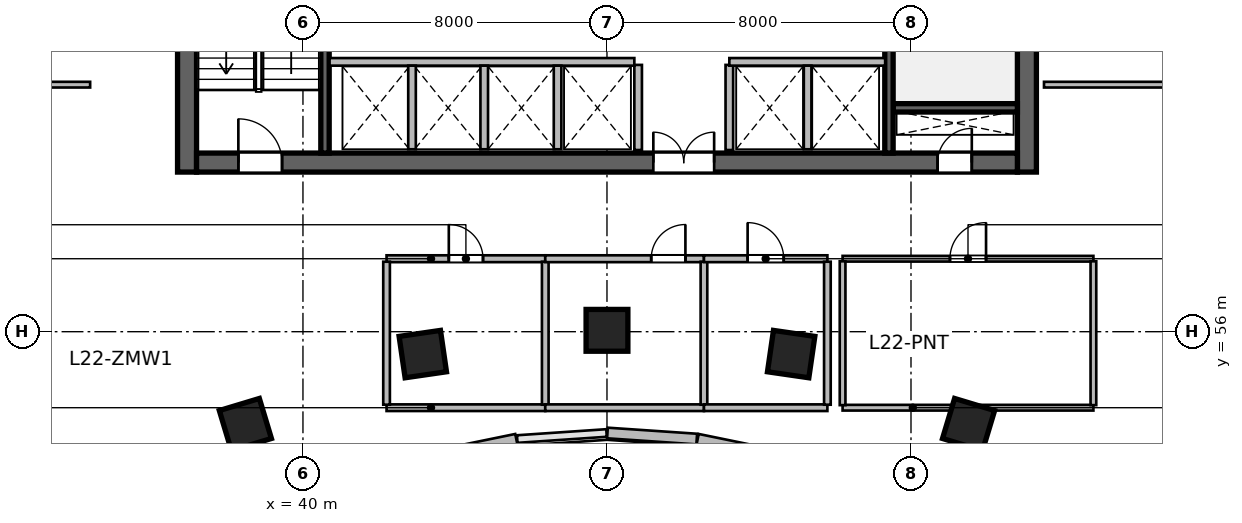
"""IFC4 building model, lengths in metres.
Left out: names, types, materials, properties, quantities, classifications, styles, units other than length and angle.
Written with IfcOpenShell. Run it as: python <this file> out.ifc"""

import sys

from ifc_helpers import new_model, si_unit, direction, frame, frame_2d, origin, origin_2d, place, context, subcontext, project, spatial, rectangle, extrude, source, transform, mapped, element, fill, save


model = new_model("IFC4")
c1 = context("Model", 3, precision=1e-05, world=origin(), true_north=direction((0.0, 1.0)))
c2 = subcontext(c1, "Body", "Model", "MODEL_VIEW")
j1 = project(units=[si_unit("LENGTHUNIT", "METRE"), si_unit("PLANEANGLEUNIT", "RADIAN")], contexts=[c1])
p1 = place(None, origin())
s1 = spatial("IfcSite", under=j1, at=p1, CompositionType="ELEMENT")
p2 = place(p1, origin())
s2 = spatial("IfcBuilding", under=s1, at=p2, CompositionType="ELEMENT")
p3 = place(p2, frame((0.0, 0.0, 96.0)))
s3 = spatial("IfcBuildingStorey", under=s2, at=p3, CompositionType="ELEMENT", Elevation=96.0)
m1 = source(origin(), c2, "Body", "SweptSolid", [
    extrude(rectangle(XDim=12.0, YDim=0.5, at=frame_2d((6.0, 0.0))), origin(), (0.0, 0.0, 1.0), 3.9),
])
for number, where, z_axis, x_axis in (
    (1, (36.95, 60.2, 0.0), (0.0, 0.0, 1.0), (0.0, 1.0, 0.0)),
    (2, (59.05, 60.2, 0.0), (0.0, 0.0, 1.0), (0.0, 1.0, 0.0)),
):
    element("IfcWall", number, at=place(p3, frame(where, z_axis=z_axis, x_axis=x_axis)), inside=s3, PredefinedType="SHEAR", context=c2, shape_type="MappedRepresentation", body=[
        mapped(m1, transform((0.0, 0.0, 0.0), scale=1.0)),
    ])
m2 = source(origin(), c2, "Body", "SweptSolid", [
    extrude(rectangle(XDim=21.6, YDim=0.5, at=frame_2d((10.8, 0.0))), origin(), (0.0, 0.0, 1.0), 3.9),
])
p4 = place(p3, frame((37.2, 60.45, 0.0), z_axis=(0.0, 0.0, 1.0), x_axis=(1.0, 0.0, 0.0)))
e3 = element("IfcWall", 3, at=p4, inside=s3, PredefinedType="SHEAR", context=c2, shape_type="MappedRepresentation", body=[
    mapped(m2, transform((0.0, 0.0, 0.0), scale=1.0)),
])
p5 = place(p4, frame((1.1, 0.0, 0.0)))
e4 = element("IfcOpeningElement", 4, at=p5, cuts=e3, PredefinedType="OPENING", context=c2, shape_type="SweptSolid", body=[
    extrude(rectangle(XDim=1.15, YDim=2.15, at=frame_2d((0.575, 1.075))), frame((0.0, 0.26, 0.0), z_axis=(0.0, -1.0, 0.0), x_axis=(1.0, 0.0, 0.0)), (0.0, 0.0, 1.0), 0.52),
])
p6 = place(p4, frame((19.5, 0.0, 0.0)))
e5 = element("IfcOpeningElement", 5, at=p6, cuts=e3, PredefinedType="OPENING", context=c2, shape_type="SweptSolid", body=[
    extrude(rectangle(XDim=0.9, YDim=2.1, at=frame_2d((0.45, 1.05))), frame((0.0, 0.26, 0.0), z_axis=(0.0, -1.0, 0.0), x_axis=(1.0, 0.0, 0.0)), (0.0, 0.0, 1.0), 0.52),
])
p7 = place(p4, frame((12.02, 0.0, 0.0)))
e6 = element("IfcOpeningElement", 6, at=p7, cuts=e3, PredefinedType="OPENING", context=c2, shape_type="SweptSolid", body=[
    extrude(rectangle(XDim=1.6, YDim=2.15, at=frame_2d((0.8, 1.075))), frame((0.0, 0.26, 0.0), z_axis=(0.0, -1.0, 0.0), x_axis=(1.0, 0.0, 0.0)), (0.0, 0.0, 1.0), 0.52),
])
m3 = source(origin(), c2, "Body", "SweptSolid", [
    extrude(rectangle(XDim=3.27, YDim=0.22, at=frame_2d((1.635, 0.0))), origin(), (0.0, 0.0, 1.0), 3.9),
])
p8 = place(p3, frame((55.53, 61.89, 0.0), z_axis=(0.0, 0.0, 1.0), x_axis=(1.0, 0.0, 0.0)))
e7 = element("IfcWall", 7, at=p8, inside=s3, PredefinedType="SHEAR", context=c2, shape_type="MappedRepresentation", body=[
    mapped(m3, transform((0.0, 0.0, 0.0), scale=1.0)),
])
m4 = source(origin(), c2, "Body", "SweptSolid", [
    extrude(rectangle(XDim=11.0, YDim=0.22, at=frame_2d((5.5, 0.0))), origin(), (0.0, 0.0, 1.0), 3.9),
])
p9 = place(p3, frame((40.58, 60.7, 0.0), z_axis=(0.0, 0.0, 1.0), x_axis=(0.0, 1.0, 0.0)))
e8 = element("IfcWall", 8, at=p9, inside=s3, PredefinedType="SHEAR", context=c2, shape_type="MappedRepresentation", body=[
    mapped(m4, transform((0.0, 0.0, 0.0), scale=1.0)),
])
p10 = place(p3, frame((55.42, 60.7, 0.0), z_axis=(0.0, 0.0, 1.0), x_axis=(0.0, 1.0, 0.0)))
e9 = element("IfcWall", 9, at=p10, inside=s3, PredefinedType="SHEAR", context=c2, shape_type="MappedRepresentation", body=[
    mapped(m4, transform((0.0, 0.0, 0.0), scale=1.0)),
])
p11 = place(p10, frame((9.545, 0.0, 0.0)))
e10 = element("IfcOpeningElement", 10, at=p11, cuts=e9, PredefinedType="OPENING", context=c2, shape_type="SweptSolid", body=[
    extrude(rectangle(XDim=1.15, YDim=2.15, at=frame_2d((0.575, 1.075))), frame((0.0, 0.12, 0.0), z_axis=(0.0, -1.0, 0.0), x_axis=(1.0, 0.0, 0.0)), (0.0, 0.0, 1.0), 0.24),
])
m5 = source(origin(), c2, "Body", "SweptSolid", [
    extrude(rectangle(XDim=1.1, YDim=1.1, at=origin_2d()), origin(), (0.0, 0.0, 1.0), 3.9),
])
for number, where, z_axis, x_axis in (
    (11, (38.485, 53.558, 0.0), (0.0, 0.0, 1.0), (-0.289, 0.957, 0.0)),
    (12, (43.154, 55.411, 0.0), (0.0, 0.0, 1.0), (-0.143, 0.99, 0.0)),
    (13, (48.0, 56.036, 0.0), (0.0, 0.0, 1.0), (0.0, 1.0, 0.0)),
    (14, (52.846, 55.411, 0.0), (0.0, 0.0, 1.0), (0.143, 0.99, 0.0)),
    (15, (57.515, 53.558, 0.0), (0.0, 0.0, 1.0), (0.289, 0.957, 0.0)),
):
    element("IfcColumn", number, at=place(p3, frame(where, z_axis=z_axis, x_axis=x_axis)), inside=s3, PredefinedType="COLUMN", context=c2, shape_type="MappedRepresentation", body=[
        mapped(m5, transform((0.0, 0.0, 0.0), scale=1.0)),
    ])
m6 = source(origin(), c2, "Body", "SweptSolid", [
    extrude(rectangle(XDim=2.374, YDim=0.28, at=frame_2d((1.187, 0.0))), origin(), (0.0, 0.0, 1.0), 3.65),
])
p12 = place(p3, frame((52.711, 52.695, 0.0), z_axis=(0.0, 0.0, 1.0), x_axis=(-0.979619827472, 0.200860632341, 0.0)))
e16 = element("IfcWall", 16, at=p12, inside=s3, PredefinedType="SOLIDWALL", context=c2, shape_type="MappedRepresentation", body=[
    mapped(m6, transform((0.0, 0.0, 0.0), scale=1.0)),
])
m7 = source(origin(), c2, "Body", "SweptSolid", [
    extrude(rectangle(XDim=2.355, YDim=0.28, at=frame_2d((1.177, 0.0))), origin(), (0.0, 0.0, 1.0), 3.65),
])
p13 = place(p3, frame((50.362, 53.175, 0.0), z_axis=(0.0, 0.0, 1.0), x_axis=(-0.997699017577, 0.067798748701, 0.0)))
e17 = element("IfcWall", 17, at=p13, inside=s3, PredefinedType="SOLIDWALL", context=c2, shape_type="MappedRepresentation", body=[
    mapped(m7, transform((0.0, 0.0, 0.0), scale=1.0)),
])
p14 = place(p3, frame((45.614, 53.172, 0.0), z_axis=(0.0, 0.0, 1.0), x_axis=(-0.979619827472, -0.200860632341, 0.0)))
e18 = element("IfcWall", 18, at=p14, inside=s3, PredefinedType="SOLIDWALL", context=c2, shape_type="MappedRepresentation", body=[
    mapped(m6, transform((0.0, 0.0, 0.0), scale=1.0)),
])
m8 = source(origin(), c2, "Body", "SweptSolid", [
    extrude(rectangle(XDim=2.24, YDim=0.2, at=frame_2d((1.12, 0.0))), origin(), (0.0, 0.0, 1.0), 3.65),
])
for number, where, z_axis, x_axis in (
    (19, (48.82, 60.78, 0.0), (0.0, 0.0, 1.0), (0.0, 1.0, 0.0)),
    (20, (51.22, 60.78, 0.0), (0.0, 0.0, 1.0), (0.0, 1.0, 0.0)),
):
    element("IfcWall", number, at=place(p3, frame(where, z_axis=z_axis, x_axis=x_axis)), inside=s3, PredefinedType="SOLIDWALL", context=c2, shape_type="MappedRepresentation", body=[
        mapped(m8, transform((0.0, 0.0, 0.0), scale=1.0)),
    ])
m9 = source(origin(), c2, "Body", "SweptSolid", [
    extrude(rectangle(XDim=8.02, YDim=0.2, at=frame_2d((4.01, 0.0))), origin(), (0.0, 0.0, 1.0), 3.65),
])
p15 = place(p3, frame((40.7, 63.1, 0.0), z_axis=(0.0, 0.0, 1.0), x_axis=(1.0, 0.0, 0.0)))
e21 = element("IfcWall", 21, at=p15, inside=s3, PredefinedType="SOLIDWALL", context=c2, shape_type="MappedRepresentation", body=[
    mapped(m9, transform((0.0, 0.0, 0.0), scale=1.0)),
])
m10 = source(origin(), c2, "Body", "SweptSolid", [
    extrude(rectangle(XDim=4.1, YDim=0.2, at=frame_2d((2.05, 0.0))), origin(), (0.0, 0.0, 1.0), 3.65),
])
p16 = place(p3, frame((51.22, 63.1, 0.0), z_axis=(0.0, 0.0, 1.0), x_axis=(1.0, 0.0, 0.0)))
e22 = element("IfcWall", 22, at=p16, inside=s3, PredefinedType="SOLIDWALL", context=c2, shape_type="MappedRepresentation", body=[
    mapped(m10, transform((0.0, 0.0, 0.0), scale=1.0)),
])
m11 = source(origin(), c2, "Body", "SweptSolid", [
    extrude(rectangle(XDim=2.2, YDim=0.2, at=frame_2d((1.1, 0.0))), origin(), (0.0, 0.0, 1.0), 3.65),
])
for number, where, z_axis, x_axis in (
    (23, (42.87, 60.8, 0.0), (0.0, 0.0, 1.0), (0.0, 1.0, 0.0)),
    (24, (44.77, 60.8, 0.0), (0.0, 0.0, 1.0), (0.0, 1.0, 0.0)),
    (25, (46.7, 60.8, 0.0), (0.0, 0.0, 1.0), (0.0, 1.0, 0.0)),
    (26, (53.28, 60.8, 0.0), (0.0, 0.0, 1.0), (0.0, 1.0, 0.0)),
):
    element("IfcWall", number, at=place(p3, frame(where, z_axis=z_axis, x_axis=x_axis)), inside=s3, PredefinedType="SOLIDWALL", context=c2, shape_type="MappedRepresentation", body=[
        mapped(m11, transform((0.0, 0.0, 0.0), scale=1.0)),
    ])
m12 = source(origin(), c2, "Body", "SweptSolid", [
    extrude(rectangle(XDim=4.176, YDim=0.175, at=frame_2d((2.088, 0.0))), origin(), (0.0, 0.0, 1.0), 3.65),
])
p17 = place(p3, frame((42.2, 54.0, 0.0), z_axis=(0.0, 0.0, 1.0), x_axis=(1.0, 0.0, 0.0)))
e27 = element("IfcWall", 27, at=p17, inside=s3, PredefinedType="PARTITIONING", context=c2, shape_type="MappedRepresentation", body=[
    mapped(m12, transform((0.0, 0.0, 0.0), scale=1.0)),
])
m13 = source(origin(), c2, "Body", "SweptSolid", [
    extrude(rectangle(XDim=4.176, YDim=0.18, at=frame_2d((2.088, 0.0))), origin(), (0.0, 0.0, 1.0), 3.65),
])
p18 = place(p3, frame((42.2, 57.92, 0.0), z_axis=(0.0, 0.0, 1.0), x_axis=(1.0, 0.0, 0.0)))
e28 = element("IfcWall", 28, at=p18, inside=s3, PredefinedType="PLUMBINGWALL", context=c2, shape_type="MappedRepresentation", body=[
    mapped(m13, transform((0.0, 0.0, 0.0), scale=1.0)),
])
p19 = place(p18, frame((1.638, 0.0, 0.0)))
e29 = element("IfcOpeningElement", 29, at=p19, cuts=e28, PredefinedType="OPENING", context=c2, shape_type="SweptSolid", body=[
    extrude(rectangle(XDim=0.9, YDim=2.08, at=frame_2d((0.45, 1.04))), frame((0.0, 0.1, 0.0), z_axis=(0.0, -1.0, 0.0), x_axis=(1.0, 0.0, 0.0)), (0.0, 0.0, 1.0), 0.2),
])
m14 = source(origin(), c2, "Body", "SweptSolid", [
    extrude(rectangle(XDim=3.763, YDim=0.175, at=frame_2d((1.881, 0.0))), origin(), (0.0, 0.0, 1.0), 3.65),
])
for number, where, z_axis, x_axis in (
    (30, (42.2, 54.079, 0.0), (0.0, 0.0, 1.0), (0.0, 1.0, 0.0)),
    (31, (46.376, 54.079, 0.0), (0.0, 0.0, 1.0), (0.0, 1.0, 0.0)),
):
    element("IfcWall", number, at=place(p3, frame(where, z_axis=z_axis, x_axis=x_axis)), inside=s3, PredefinedType="PARTITIONING", context=c2, shape_type="MappedRepresentation", body=[
        mapped(m14, transform((0.0, 0.0, 0.0), scale=1.0)),
    ])
p20 = place(p3, frame((46.376, 54.0, 0.0), z_axis=(0.0, 0.0, 1.0), x_axis=(1.0, 0.0, 0.0)))
e32 = element("IfcWall", 32, at=p20, inside=s3, PredefinedType="PARTITIONING", context=c2, shape_type="MappedRepresentation", body=[
    mapped(m12, transform((0.0, 0.0, 0.0), scale=1.0)),
])
p21 = place(p3, frame((46.376, 57.92, 0.0), z_axis=(0.0, 0.0, 1.0), x_axis=(1.0, 0.0, 0.0)))
e33 = element("IfcWall", 33, at=p21, inside=s3, PredefinedType="PLUMBINGWALL", context=c2, shape_type="MappedRepresentation", body=[
    mapped(m13, transform((0.0, 0.0, 0.0), scale=1.0)),
])
p22 = place(p21, frame((2.788, 0.0, 0.0)))
e34 = element("IfcOpeningElement", 34, at=p22, cuts=e33, PredefinedType="OPENING", context=c2, shape_type="SweptSolid", body=[
    extrude(rectangle(XDim=0.9, YDim=2.08, at=frame_2d((0.45, 1.04))), frame((0.0, 0.1, 0.0), z_axis=(0.0, -1.0, 0.0), x_axis=(1.0, 0.0, 0.0)), (0.0, 0.0, 1.0), 0.2),
])
p23 = place(p3, frame((50.552, 54.079, 0.0), z_axis=(0.0, 0.0, 1.0), x_axis=(0.0, 1.0, 0.0)))
e35 = element("IfcWall", 35, at=p23, inside=s3, PredefinedType="PARTITIONING", context=c2, shape_type="MappedRepresentation", body=[
    mapped(m14, transform((0.0, 0.0, 0.0), scale=1.0)),
])
m15 = source(origin(), c2, "Body", "SweptSolid", [
    extrude(rectangle(XDim=3.248, YDim=0.175, at=frame_2d((1.624, 0.0))), origin(), (0.0, 0.0, 1.0), 3.65),
])
p24 = place(p3, frame((50.552, 54.0, 0.0), z_axis=(0.0, 0.0, 1.0), x_axis=(1.0, 0.0, 0.0)))
e36 = element("IfcWall", 36, at=p24, inside=s3, PredefinedType="PARTITIONING", context=c2, shape_type="MappedRepresentation", body=[
    mapped(m15, transform((0.0, 0.0, 0.0), scale=1.0)),
])
m16 = source(origin(), c2, "Body", "SweptSolid", [
    extrude(rectangle(XDim=3.248, YDim=0.18, at=frame_2d((1.624, 0.0))), origin(), (0.0, 0.0, 1.0), 3.65),
])
p25 = place(p3, frame((50.552, 57.92, 0.0), z_axis=(0.0, 0.0, 1.0), x_axis=(1.0, 0.0, 0.0)))
e37 = element("IfcWall", 37, at=p25, inside=s3, PredefinedType="PLUMBINGWALL", context=c2, shape_type="MappedRepresentation", body=[
    mapped(m16, transform((0.0, 0.0, 0.0), scale=1.0)),
])
p26 = place(p25, frame((1.149, 0.0, 0.0)))
e38 = element("IfcOpeningElement", 38, at=p26, cuts=e37, PredefinedType="OPENING", context=c2, shape_type="SweptSolid", body=[
    extrude(rectangle(XDim=0.95, YDim=2.12, at=frame_2d((0.475, 1.06))), frame((0.0, 0.1, 0.0), z_axis=(0.0, -1.0, 0.0), x_axis=(1.0, 0.0, 0.0)), (0.0, 0.0, 1.0), 0.2),
])
p27 = place(p3, frame((53.8, 54.079, 0.0), z_axis=(0.0, 0.0, 1.0), x_axis=(0.0, 1.0, 0.0)))
e39 = element("IfcWall", 39, at=p27, inside=s3, PredefinedType="PARTITIONING", context=c2, shape_type="MappedRepresentation", body=[
    mapped(m14, transform((0.0, 0.0, 0.0), scale=1.0)),
])
m17 = source(origin(), c2, "Body", "SweptSolid", [
    extrude(rectangle(XDim=6.6, YDim=0.15, at=frame_2d((3.3, 0.0))), origin(), (0.0, 0.0, 1.0), 3.095),
])
p28 = place(p3, frame((54.2, 54.0, 0.0), z_axis=(0.0, 0.0, 1.0), x_axis=(1.0, 0.0, 0.0)))
e40 = element("IfcWall", 40, at=p28, inside=s3, PredefinedType="PARTITIONING", context=c2, shape_type="MappedRepresentation", body=[
    mapped(m17, transform((0.0, 0.0, 0.0), scale=1.0)),
])
m18 = source(origin(), c2, "Body", "SweptSolid", [
    extrude(rectangle(XDim=6.6, YDim=0.15, at=frame_2d((3.3, 0.0))), origin(), (0.0, 0.0, 1.0), 3.65),
])
p29 = place(p3, frame((54.2, 57.92, 0.0), z_axis=(0.0, 0.0, 1.0), x_axis=(1.0, 0.0, 0.0)))
e41 = element("IfcWall", 41, at=p29, inside=s3, PredefinedType="PARTITIONING", context=c2, shape_type="MappedRepresentation", body=[
    mapped(m18, transform((0.0, 0.0, 0.0), scale=1.0)),
])
p30 = place(p29, frame((2.825, 0.0, 0.0)))
e42 = element("IfcOpeningElement", 42, at=p30, cuts=e41, PredefinedType="OPENING", context=c2, shape_type="SweptSolid", body=[
    extrude(rectangle(XDim=0.95, YDim=2.1, at=frame_2d((0.475, 1.05))), frame((0.0, 0.085, 0.0), z_axis=(0.0, -1.0, 0.0), x_axis=(1.0, 0.0, 0.0)), (0.0, 0.0, 1.0), 0.17),
])
m19 = source(origin(), c2, "Body", "SweptSolid", [
    extrude(rectangle(XDim=3.785, YDim=0.15, at=frame_2d((1.893, 0.0))), origin(), (0.0, 0.0, 1.0), 3.65),
])
for number, where, z_axis, x_axis in (
    (43, (54.2, 54.067, 0.0), (0.0, 0.0, 1.0), (0.0, 1.0, 0.0)),
    (44, (60.8, 54.067, 0.0), (0.0, 0.0, 1.0), (0.0, 1.0, 0.0)),
):
    element("IfcWall", number, at=place(p3, frame(where, z_axis=z_axis, x_axis=x_axis)), inside=s3, PredefinedType="PARTITIONING", context=c2, shape_type="MappedRepresentation", body=[
        mapped(m19, transform((0.0, 0.0, 0.0), scale=1.0)),
    ])
m20 = source(origin(), c2, "Body", "SweptSolid", [
    extrude(rectangle(XDim=2.66, YDim=0.15, at=frame_2d((1.33, 0.0))), origin(), (0.0, 0.0, 1.0), 3.65),
])
p31 = place(p3, frame((31.74, 62.5, 0.0), z_axis=(0.0, 0.0, 1.0), x_axis=(1.0, 0.0, 0.0)))
e45 = element("IfcWall", 45, at=p31, inside=s3, PredefinedType="PARTITIONING", context=c2, shape_type="MappedRepresentation", body=[
    mapped(m20, transform((0.0, 0.0, 0.0), scale=1.0)),
])
m21 = source(origin(), c2, "Body", "SweptSolid", [
    extrude(rectangle(XDim=4.76, YDim=0.15, at=frame_2d((2.38, 0.0))), origin(), (0.0, 0.0, 1.0), 3.65),
])
p32 = place(p3, frame((59.5, 62.5, 0.0), z_axis=(0.0, 0.0, 1.0), x_axis=(1.0, 0.0, 0.0)))
e46 = element("IfcWall", 46, at=p32, inside=s3, PredefinedType="PARTITIONING", context=c2, shape_type="MappedRepresentation", body=[
    mapped(m21, transform((0.0, 0.0, 0.0), scale=1.0)),
])
m22 = source(origin(), c2, "Body", "SweptSolid", [
    extrude(rectangle(XDim=1.15, YDim=2.15, at=frame_2d((0.575, 1.075))), frame((0.0, 0.025, 0.0), z_axis=(0.0, -1.0, 0.0), x_axis=(1.0, 0.0, 0.0)), (0.0, 0.0, 1.0), 0.05),
])
p33 = place(p5, origin())
e47 = element("IfcDoor", 47, at=p33, inside=s3, OperationType="SINGLE_SWING_LEFT", PredefinedType="DOOR", context=c2, shape_type="MappedRepresentation", body=[
    mapped(m22, transform((0.0, 0.0, 0.0), scale=1.0)),
])
fill(e4, e47)
m23 = source(origin(), c2, "Body", "SweptSolid", [
    extrude(rectangle(XDim=0.9, YDim=2.1, at=frame_2d((0.45, 1.05))), frame((0.0, 0.025, 0.0), z_axis=(0.0, -1.0, 0.0), x_axis=(1.0, 0.0, 0.0)), (0.0, 0.0, 1.0), 0.05),
])
p34 = place(p6, origin())
e48 = element("IfcDoor", 48, at=p34, inside=s3, OperationType="SINGLE_SWING_RIGHT", PredefinedType="DOOR", context=c2, shape_type="MappedRepresentation", body=[
    mapped(m23, transform((0.0, 0.0, 0.0), scale=1.0)),
])
fill(e5, e48)
m24 = source(origin(), c2, "Body", "SweptSolid", [
    extrude(rectangle(XDim=1.6, YDim=2.15, at=frame_2d((0.8, 1.075))), frame((0.0, 0.025, 0.0), z_axis=(0.0, -1.0, 0.0), x_axis=(1.0, 0.0, 0.0)), (0.0, 0.0, 1.0), 0.05),
])
p35 = place(p7, origin())
e49 = element("IfcDoor", 49, at=p35, inside=s3, OperationType="DOUBLE_DOOR_SINGLE_SWING", PredefinedType="DOOR", context=c2, shape_type="MappedRepresentation", body=[
    mapped(m24, transform((0.0, 0.0, 0.0), scale=1.0)),
])
fill(e6, e49)
m25 = source(origin(), c2, "Body", "SweptSolid", [
    extrude(rectangle(XDim=0.9, YDim=2.08, at=frame_2d((0.45, 1.04))), frame((0.0, 0.025, 0.0), z_axis=(0.0, -1.0, 0.0), x_axis=(1.0, 0.0, 0.0)), (0.0, 0.0, 1.0), 0.05),
])
p36 = place(p19, origin())
e50 = element("IfcDoor", 50, at=p36, inside=s3, OperationType="SINGLE_SWING_LEFT", PredefinedType="DOOR", context=c2, shape_type="MappedRepresentation", body=[
    mapped(m25, transform((0.0, 0.0, 0.0), scale=1.0)),
])
fill(e29, e50)
p37 = place(p22, origin())
e51 = element("IfcDoor", 51, at=p37, inside=s3, OperationType="SINGLE_SWING_RIGHT", PredefinedType="DOOR", context=c2, shape_type="MappedRepresentation", body=[
    mapped(m25, transform((0.0, 0.0, 0.0), scale=1.0)),
])
fill(e34, e51)
m26 = source(origin(), c2, "Body", "SweptSolid", [
    extrude(rectangle(XDim=0.95, YDim=2.12, at=frame_2d((0.475, 1.06))), frame((0.0, 0.025, 0.0), z_axis=(0.0, -1.0, 0.0), x_axis=(1.0, 0.0, 0.0)), (0.0, 0.0, 1.0), 0.05),
])
p38 = place(p26, origin())
e52 = element("IfcDoor", 52, at=p38, inside=s3, OperationType="SINGLE_SWING_LEFT", PredefinedType="DOOR", context=c2, shape_type="MappedRepresentation", body=[
    mapped(m26, transform((0.0, 0.0, 0.0), scale=1.0)),
])
fill(e38, e52)
m27 = source(origin(), c2, "Body", "SweptSolid", [
    extrude(rectangle(XDim=0.95, YDim=2.1, at=frame_2d((0.475, 1.05))), frame((0.0, 0.025, 0.0), z_axis=(0.0, -1.0, 0.0), x_axis=(1.0, 0.0, 0.0)), (0.0, 0.0, 1.0), 0.05),
])
p39 = place(p30, origin())
e53 = element("IfcDoor", 53, at=p39, inside=s3, OperationType="SINGLE_SWING_RIGHT", PredefinedType="DOOR", context=c2, shape_type="MappedRepresentation", body=[
    mapped(m27, transform((0.0, 0.0, 0.0), scale=1.0)),
])
fill(e42, e53)
save(model, sys.argv[1])
